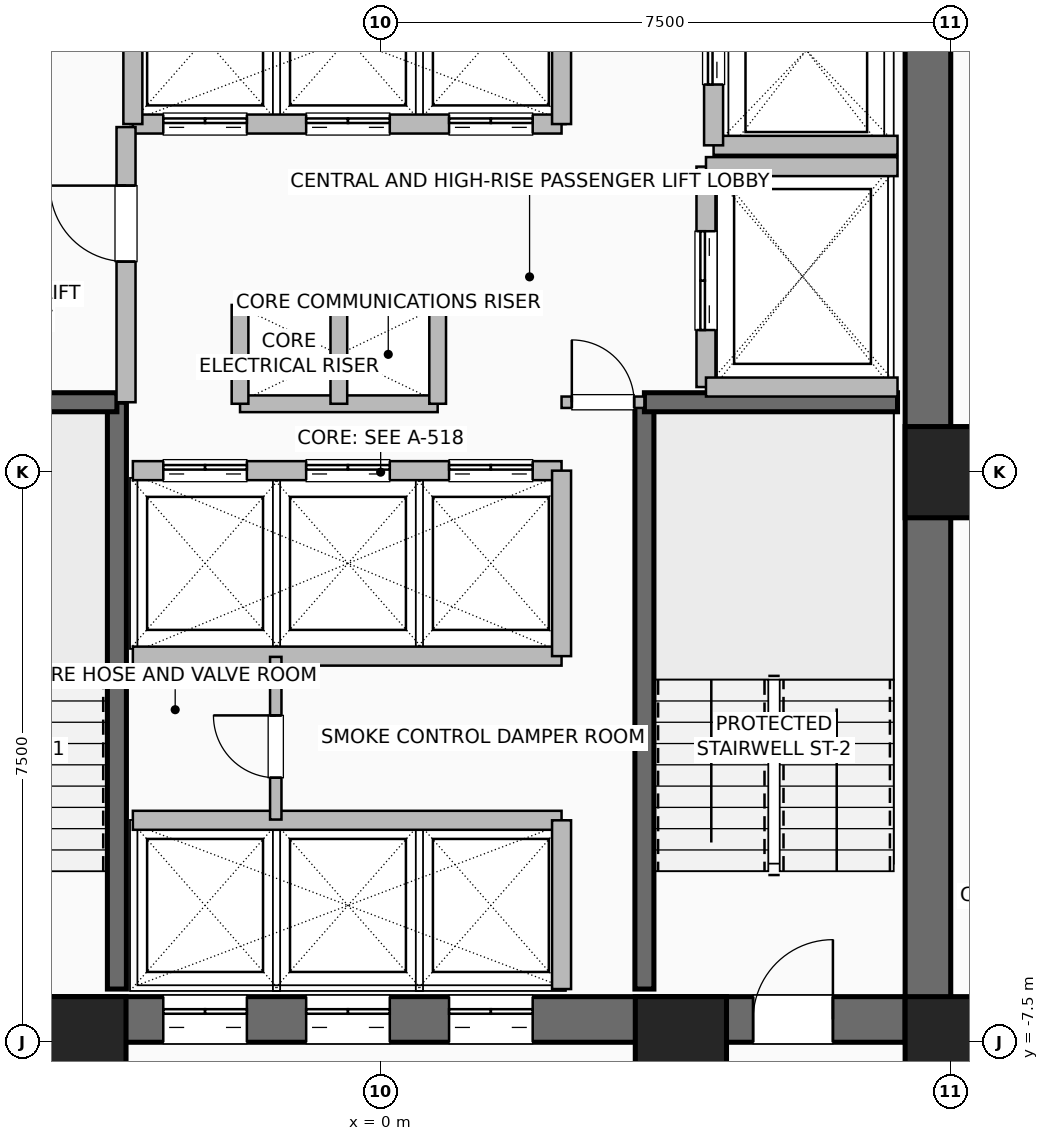
"""IFC4 building model, lengths in metres.
Left out: names, types, materials, properties, quantities, classifications, styles, units other than length and angle.
Written with IfcOpenShell. Run it as: python <this file> out.ifc"""

import sys

from ifc_helpers import new_model, si_unit, direction, frame, frame_2d, origin, origin_2d, place, context, subcontext, project, spatial, rectangle, hollow_rectangle, extrude, element, fill, save


model = new_model("IFC4")
c1 = context("Model", 3, precision=1e-05, world=origin(), true_north=direction((0.0, 1.0)))
c2 = subcontext(c1, "Body", "Model", "MODEL_VIEW")
j1 = project(units=[si_unit("LENGTHUNIT", "METRE"), si_unit("PLANEANGLEUNIT", "RADIAN")], contexts=[c1])
p1 = place(None, origin())
s1 = spatial("IfcSite", under=j1, at=p1, CompositionType="ELEMENT")
p2 = place(p1, origin())
s2 = spatial("IfcBuilding", under=s1, at=p2, CompositionType="ELEMENT")
p3 = place(p2, frame((0.0, 0.0, 69.0)))
s3 = spatial("IfcBuildingStorey", under=s2, at=p3, CompositionType="ELEMENT", Elevation=69.0)
for number, where, z_axis, x_axis in (
    (1, (-3.95, -7.5, 0.0), (0.0, 0.0, 1.0), (1.0, 0.0, 0.0)),
    (2, (3.95, -7.5, 0.0), (0.0, 0.0, 1.0), (1.0, 0.0, 0.0)),
    (3, (7.5, -7.5, 0.0), (0.0, 0.0, 1.0), (1.0, 0.0, 0.0)),
    (4, (7.5, 0.0, 0.0), (0.0, 0.0, 1.0), (1.0, 0.0, 0.0)),
):
    element("IfcColumn", number, at=place(p3, frame(where, z_axis=z_axis, x_axis=x_axis)), inside=s3, PredefinedType="COLUMN", context=c2, shape_type="SweptSolid", body=[
        extrude(hollow_rectangle(XDim=1.2, YDim=1.2, WallThickness=0.055, at=origin_2d()), origin(), (0.0, 0.0, 1.0), 3.5),
    ])
p4 = place(p3, frame((-7.5, -7.2, 0.0), z_axis=(0.0, 0.0, 1.0), x_axis=(1.0, 0.0, 0.0)))
e5 = element("IfcWall", 5, at=p4, inside=s3, PredefinedType="SHEAR", context=c2, shape_type="SweptSolid", body=[
    extrude(rectangle(XDim=15.0, YDim=0.6, at=frame_2d((7.5, 0.0))), origin(), (0.0, 0.0, 1.0), 3.25),
])
p5 = place(p4, frame((1.55, 0.0, 0.0)))
e6 = element("IfcOpeningElement", 6, at=p5, cuts=e5, PredefinedType="OPENING", context=c2, shape_type="SweptSolid", body=[
    extrude(rectangle(XDim=1.05, YDim=2.08, at=frame_2d((0.525, 1.04))), frame((0.0, 0.31, 0.0), z_axis=(0.0, -1.0, 0.0), x_axis=(1.0, 0.0, 0.0)), (0.0, 0.0, 1.0), 0.62),
])
p6 = place(p4, frame((12.4, 0.0, 0.0)))
e7 = element("IfcOpeningElement", 7, at=p6, cuts=e5, PredefinedType="OPENING", context=c2, shape_type="SweptSolid", body=[
    extrude(rectangle(XDim=1.05, YDim=2.08, at=frame_2d((0.525, 1.04))), frame((0.0, 0.31, 0.0), z_axis=(0.0, -1.0, 0.0), x_axis=(1.0, 0.0, 0.0)), (0.0, 0.0, 1.0), 0.62),
])
p7 = place(p4, frame((4.64, 0.0, 0.0)))
e8 = element("IfcOpeningElement", 8, at=p7, cuts=e5, PredefinedType="OPENING", context=c2, shape_type="SweptSolid", body=[
    extrude(rectangle(XDim=1.1, YDim=2.2, at=frame_2d((0.55, 1.1))), frame((0.0, 0.31, 0.0), z_axis=(0.0, -1.0, 0.0), x_axis=(1.0, 0.0, 0.0)), (0.0, 0.0, 1.0), 0.62),
])
p8 = place(p4, frame((6.52, 0.0, 0.0)))
e9 = element("IfcOpeningElement", 9, at=p8, cuts=e5, PredefinedType="OPENING", context=c2, shape_type="SweptSolid", body=[
    extrude(rectangle(XDim=1.1, YDim=2.2, at=frame_2d((0.55, 1.1))), frame((0.0, 0.31, 0.0), z_axis=(0.0, -1.0, 0.0), x_axis=(1.0, 0.0, 0.0)), (0.0, 0.0, 1.0), 0.62),
])
p9 = place(p4, frame((8.4, 0.0, 0.0)))
e10 = element("IfcOpeningElement", 10, at=p9, cuts=e5, PredefinedType="OPENING", context=c2, shape_type="SweptSolid", body=[
    extrude(rectangle(XDim=1.1, YDim=2.2, at=frame_2d((0.55, 1.1))), frame((0.0, 0.31, 0.0), z_axis=(0.0, -1.0, 0.0), x_axis=(1.0, 0.0, 0.0)), (0.0, 0.0, 1.0), 0.62),
])
p10 = place(p3, frame((7.2, -7.5, 0.0), z_axis=(0.0, 0.0, 1.0), x_axis=(0.0, 1.0, 0.0)))
e11 = element("IfcWall", 11, at=p10, inside=s3, PredefinedType="SHEAR", context=c2, shape_type="SweptSolid", body=[
    extrude(rectangle(XDim=15.0, YDim=0.6, at=frame_2d((7.5, 0.0))), origin(), (0.0, 0.0, 1.0), 3.25),
])
p11 = place(p3, frame((-3.47, -6.8, 0.0), z_axis=(0.0, 0.0, 1.0), x_axis=(0.0, 1.0, 0.0)))
e12 = element("IfcWall", 12, at=p11, inside=s3, PredefinedType="SHEAR", context=c2, shape_type="SweptSolid", body=[
    extrude(rectangle(XDim=7.72, YDim=0.25, at=frame_2d((3.86, 0.0))), origin(), (0.0, 0.0, 1.0), 3.25),
])
p12 = place(p3, frame((-6.8, 0.92, 0.0), z_axis=(0.0, 0.0, 1.0), x_axis=(1.0, 0.0, 0.0)))
e13 = element("IfcWall", 13, at=p12, inside=s3, PredefinedType="SHEAR", context=c2, shape_type="SweptSolid", body=[
    extrude(rectangle(XDim=3.33, YDim=0.25, at=frame_2d((1.665, 0.0))), origin(), (0.0, 0.0, 1.0), 3.25),
])
p13 = place(p3, frame((3.47, -6.8, 0.0), z_axis=(0.0, 0.0, 1.0), x_axis=(0.0, 1.0, 0.0)))
e14 = element("IfcWall", 14, at=p13, inside=s3, PredefinedType="SHEAR", context=c2, shape_type="SweptSolid", body=[
    extrude(rectangle(XDim=7.72, YDim=0.25, at=frame_2d((3.86, 0.0))), origin(), (0.0, 0.0, 1.0), 3.25),
])
p14 = place(p3, frame((3.47, 0.92, 0.0), z_axis=(0.0, 0.0, 1.0), x_axis=(1.0, 0.0, 0.0)))
e15 = element("IfcWall", 15, at=p14, inside=s3, PredefinedType="SHEAR", context=c2, shape_type="SweptSolid", body=[
    extrude(rectangle(XDim=3.33, YDim=0.25, at=frame_2d((1.665, 0.0))), origin(), (0.0, 0.0, 1.0), 3.25),
])
for number, where, z_axis, x_axis in (
    (16, (-1.85, 2.2, 0.0), (0.0, 0.0, 1.0), (1.0, 0.0, 0.0)),
    (17, (-1.85, 0.9, 0.0), (0.0, 0.0, 1.0), (1.0, 0.0, 0.0)),
):
    element("IfcWall", number, at=place(p3, frame(where, z_axis=z_axis, x_axis=x_axis)), inside=s3, PredefinedType="PARTITIONING", context=c2, shape_type="SweptSolid", body=[
        extrude(rectangle(XDim=2.6, YDim=0.22, at=frame_2d((1.3, 0.0))), origin(), (0.0, 0.0, 1.0), 3.25),
    ])
for number, where, z_axis, x_axis in (
    (18, (-0.55, 0.9, 0.0), (0.0, 0.0, 1.0), (0.0, 1.0, 0.0)),
    (19, (0.75, 0.9, 0.0), (0.0, 0.0, 1.0), (0.0, 1.0, 0.0)),
    (20, (-1.85, 0.9, 0.0), (0.0, 0.0, 1.0), (0.0, 1.0, 0.0)),
):
    element("IfcWall", number, at=place(p3, frame(where, z_axis=z_axis, x_axis=x_axis)), inside=s3, PredefinedType="PARTITIONING", context=c2, shape_type="SweptSolid", body=[
        extrude(rectangle(XDim=1.3, YDim=0.22, at=frame_2d((0.65, 0.0))), origin(), (0.0, 0.0, 1.0), 3.25),
    ])
p15 = place(p3, frame((-3.26, -4.58, 0.0), z_axis=(0.0, 0.0, 1.0), x_axis=(1.0, 0.0, 0.0)))
e21 = element("IfcWall", 21, at=p15, inside=s3, PredefinedType="SHEAR", context=c2, shape_type="SweptSolid", body=[
    extrude(rectangle(XDim=5.64, YDim=0.25, at=frame_2d((2.82, 0.0))), origin(), (0.0, 0.0, 1.0), 3.25),
])
p16 = place(p3, frame((2.38, -6.8, 0.0), z_axis=(0.0, 0.0, 1.0), x_axis=(0.0, 1.0, 0.0)))
e22 = element("IfcWall", 22, at=p16, inside=s3, PredefinedType="SHEAR", context=c2, shape_type="SweptSolid", body=[
    extrude(rectangle(XDim=2.22, YDim=0.25, at=frame_2d((1.11, 0.0))), origin(), (0.0, 0.0, 1.0), 3.25),
])
p17 = place(p3, frame((-3.26, 0.02, 0.0), z_axis=(0.0, 0.0, 1.0), x_axis=(1.0, 0.0, 0.0)))
e23 = element("IfcWall", 23, at=p17, inside=s3, PredefinedType="SHEAR", context=c2, shape_type="SweptSolid", body=[
    extrude(rectangle(XDim=5.64, YDim=0.25, at=frame_2d((2.82, 0.0))), origin(), (0.0, 0.0, 1.0), 3.25),
])
p18 = place(p17, frame((0.4, 0.0, 0.0)))
e24 = element("IfcOpeningElement", 24, at=p18, cuts=e23, PredefinedType="OPENING", context=c2, shape_type="SweptSolid", body=[
    extrude(rectangle(XDim=1.1, YDim=2.2, at=frame_2d((0.55, 1.1))), frame((0.0, 0.135, 0.0), z_axis=(0.0, -1.0, 0.0), x_axis=(1.0, 0.0, 0.0)), (0.0, 0.0, 1.0), 0.27),
])
p19 = place(p17, frame((2.28, 0.0, 0.0)))
e25 = element("IfcOpeningElement", 25, at=p19, cuts=e23, PredefinedType="OPENING", context=c2, shape_type="SweptSolid", body=[
    extrude(rectangle(XDim=1.1, YDim=2.2, at=frame_2d((0.55, 1.1))), frame((0.0, 0.135, 0.0), z_axis=(0.0, -1.0, 0.0), x_axis=(1.0, 0.0, 0.0)), (0.0, 0.0, 1.0), 0.27),
])
p20 = place(p17, frame((4.16, 0.0, 0.0)))
e26 = element("IfcOpeningElement", 26, at=p20, cuts=e23, PredefinedType="OPENING", context=c2, shape_type="SweptSolid", body=[
    extrude(rectangle(XDim=1.1, YDim=2.2, at=frame_2d((0.55, 1.1))), frame((0.0, 0.135, 0.0), z_axis=(0.0, -1.0, 0.0), x_axis=(1.0, 0.0, 0.0)), (0.0, 0.0, 1.0), 0.27),
])
p21 = place(p3, frame((-3.26, -2.42, 0.0), z_axis=(0.0, 0.0, 1.0), x_axis=(1.0, 0.0, 0.0)))
e27 = element("IfcWall", 27, at=p21, inside=s3, PredefinedType="SHEAR", context=c2, shape_type="SweptSolid", body=[
    extrude(rectangle(XDim=5.64, YDim=0.25, at=frame_2d((2.82, 0.0))), origin(), (0.0, 0.0, 1.0), 3.25),
])
p22 = place(p3, frame((2.38, -2.42, 0.0), z_axis=(0.0, 0.0, 1.0), x_axis=(0.0, 1.0, 0.0)))
e28 = element("IfcWall", 28, at=p22, inside=s3, PredefinedType="SHEAR", context=c2, shape_type="SweptSolid", body=[
    extrude(rectangle(XDim=2.44, YDim=0.25, at=frame_2d((1.22, 0.0))), origin(), (0.0, 0.0, 1.0), 3.25),
])
p23 = place(p3, frame((-3.26, 4.58, 0.0), z_axis=(0.0, 0.0, 1.0), x_axis=(1.0, 0.0, 0.0)))
e29 = element("IfcWall", 29, at=p23, inside=s3, PredefinedType="SHEAR", context=c2, shape_type="SweptSolid", body=[
    extrude(rectangle(XDim=5.64, YDim=0.25, at=frame_2d((2.82, 0.0))), origin(), (0.0, 0.0, 1.0), 3.25),
])
p24 = place(p23, frame((0.4, 0.0, 0.0)))
e30 = element("IfcOpeningElement", 30, at=p24, cuts=e29, PredefinedType="OPENING", context=c2, shape_type="SweptSolid", body=[
    extrude(rectangle(XDim=1.1, YDim=2.2, at=frame_2d((0.55, 1.1))), frame((0.0, 0.135, 0.0), z_axis=(0.0, -1.0, 0.0), x_axis=(1.0, 0.0, 0.0)), (0.0, 0.0, 1.0), 0.27),
])
p25 = place(p23, frame((2.28, 0.0, 0.0)))
e31 = element("IfcOpeningElement", 31, at=p25, cuts=e29, PredefinedType="OPENING", context=c2, shape_type="SweptSolid", body=[
    extrude(rectangle(XDim=1.1, YDim=2.2, at=frame_2d((0.55, 1.1))), frame((0.0, 0.135, 0.0), z_axis=(0.0, -1.0, 0.0), x_axis=(1.0, 0.0, 0.0)), (0.0, 0.0, 1.0), 0.27),
])
p26 = place(p23, frame((4.16, 0.0, 0.0)))
e32 = element("IfcOpeningElement", 32, at=p26, cuts=e29, PredefinedType="OPENING", context=c2, shape_type="SweptSolid", body=[
    extrude(rectangle(XDim=1.1, YDim=2.2, at=frame_2d((0.55, 1.1))), frame((0.0, 0.135, 0.0), z_axis=(0.0, -1.0, 0.0), x_axis=(1.0, 0.0, 0.0)), (0.0, 0.0, 1.0), 0.27),
])
for number, where, z_axis, x_axis in (
    (33, (-3.26, 4.58, 0.0), (0.0, 0.0, 1.0), (0.0, 1.0, 0.0)),
    (34, (2.38, 4.58, 0.0), (0.0, 0.0, 1.0), (0.0, 1.0, 0.0)),
):
    element("IfcWall", number, at=place(p3, frame(where, z_axis=z_axis, x_axis=x_axis)), inside=s3, PredefinedType="SHEAR", context=c2, shape_type="SweptSolid", body=[
        extrude(rectangle(XDim=2.22, YDim=0.25, at=frame_2d((1.11, 0.0))), origin(), (0.0, 0.0, 1.0), 3.25),
    ])
p27 = place(p3, frame((4.38, 4.3, 0.0), z_axis=(0.0, 0.0, 1.0), x_axis=(1.0, 0.0, 0.0)))
e35 = element("IfcWall", 35, at=p27, inside=s3, PredefinedType="SHEAR", context=c2, shape_type="SweptSolid", body=[
    extrude(rectangle(XDim=2.42, YDim=0.25, at=frame_2d((1.21, 0.0))), origin(), (0.0, 0.0, 1.0), 3.25),
])
p28 = place(p3, frame((4.38, 4.3, 0.0), z_axis=(0.0, 0.0, 1.0), x_axis=(0.0, 1.0, 0.0)))
e36 = element("IfcWall", 36, at=p28, inside=s3, PredefinedType="SHEAR", context=c2, shape_type="SweptSolid", body=[
    extrude(rectangle(XDim=2.5, YDim=0.25, at=frame_2d((1.25, 0.0))), origin(), (0.0, 0.0, 1.0), 3.25),
])
p29 = place(p28, frame((0.8, 0.0, 0.0)))
e37 = element("IfcOpeningElement", 37, at=p29, cuts=e36, PredefinedType="OPENING", context=c2, shape_type="SweptSolid", body=[
    extrude(rectangle(XDim=1.2, YDim=2.2, at=frame_2d((0.6, 1.1))), frame((0.0, 0.135, 0.0), z_axis=(0.0, -1.0, 0.0), x_axis=(1.0, 0.0, 0.0)), (0.0, 0.0, 1.0), 0.27),
])
p30 = place(p3, frame((4.28, 1.12, 0.0), z_axis=(0.0, 0.0, 1.0), x_axis=(0.0, 1.0, 0.0)))
e38 = element("IfcWall", 38, at=p30, inside=s3, PredefinedType="SHEAR", context=c2, shape_type="SweptSolid", body=[
    extrude(rectangle(XDim=2.9, YDim=0.25, at=frame_2d((1.45, 0.0))), origin(), (0.0, 0.0, 1.0), 3.25),
])
p31 = place(p30, frame((0.75, 0.0, 0.0)))
e39 = element("IfcOpeningElement", 39, at=p31, cuts=e38, PredefinedType="OPENING", context=c2, shape_type="SweptSolid", body=[
    extrude(rectangle(XDim=1.3, YDim=2.3, at=frame_2d((0.65, 1.15))), frame((0.0, 0.135, 0.0), z_axis=(0.0, -1.0, 0.0), x_axis=(1.0, 0.0, 0.0)), (0.0, 0.0, 1.0), 0.27),
])
for number, where, z_axis, x_axis in (
    (40, (4.28, 1.12, 0.0), (0.0, 0.0, 1.0), (1.0, 0.0, 0.0)),
    (41, (4.28, 4.02, 0.0), (0.0, 0.0, 1.0), (1.0, 0.0, 0.0)),
):
    element("IfcWall", number, at=place(p3, frame(where, z_axis=z_axis, x_axis=x_axis)), inside=s3, PredefinedType="SHEAR", context=c2, shape_type="SweptSolid", body=[
        extrude(rectangle(XDim=2.52, YDim=0.25, at=frame_2d((1.26, 0.0))), origin(), (0.0, 0.0, 1.0), 3.25),
    ])
p32 = place(p3, frame((-3.35, 0.92, 0.0), z_axis=(0.0, 0.0, 1.0), x_axis=(0.0, 1.0, 0.0)))
e42 = element("IfcWall", 42, at=p32, inside=s3, PredefinedType="SHEAR", context=c2, shape_type="SweptSolid", body=[
    extrude(rectangle(XDim=3.62, YDim=0.25, at=frame_2d((1.81, 0.0))), origin(), (0.0, 0.0, 1.0), 3.25),
])
p33 = place(p32, frame((1.85, 0.0, 0.0)))
e43 = element("IfcOpeningElement", 43, at=p33, cuts=e42, PredefinedType="OPENING", context=c2, shape_type="SweptSolid", body=[
    extrude(rectangle(XDim=1.0, YDim=2.08, at=frame_2d((0.5, 1.04))), frame((0.0, 0.135, 0.0), z_axis=(0.0, -1.0, 0.0), x_axis=(1.0, 0.0, 0.0)), (0.0, 0.0, 1.0), 0.27),
])
p34 = place(p3, frame((2.38, 0.92, 0.0), z_axis=(0.0, 0.0, 1.0), x_axis=(1.0, 0.0, 0.0)))
e44 = element("IfcWall", 44, at=p34, inside=s3, PredefinedType="PARTITIONING", context=c2, shape_type="SweptSolid", body=[
    extrude(rectangle(XDim=1.09, YDim=0.15, at=frame_2d((0.545, 0.0))), origin(), (0.0, 0.0, 1.0), 3.25),
])
p35 = place(p34, frame((0.135, 0.0, 0.0)))
e45 = element("IfcOpeningElement", 45, at=p35, cuts=e44, PredefinedType="OPENING", context=c2, shape_type="SweptSolid", body=[
    extrude(rectangle(XDim=0.82, YDim=2.05, at=frame_2d((0.41, 1.025))), frame((0.0, 0.085, 0.0), z_axis=(0.0, -1.0, 0.0), x_axis=(1.0, 0.0, 0.0)), (0.0, 0.0, 1.0), 0.17),
])
p36 = place(p3, frame((-1.38, -4.57, 0.0), z_axis=(0.0, 0.0, 1.0), x_axis=(0.0, 1.0, 0.0)))
e46 = element("IfcWall", 46, at=p36, inside=s3, PredefinedType="PARTITIONING", context=c2, shape_type="SweptSolid", body=[
    extrude(rectangle(XDim=2.14, YDim=0.15, at=frame_2d((1.07, 0.0))), origin(), (0.0, 0.0, 1.0), 3.25),
])
p37 = place(p36, frame((0.55, 0.0, 0.0)))
e47 = element("IfcOpeningElement", 47, at=p37, cuts=e46, PredefinedType="OPENING", context=c2, shape_type="SweptSolid", body=[
    extrude(rectangle(XDim=0.82, YDim=2.05, at=frame_2d((0.41, 1.025))), frame((0.0, 0.085, 0.0), z_axis=(0.0, -1.0, 0.0), x_axis=(1.0, 0.0, 0.0)), (0.0, 0.0, 1.0), 0.17),
])
p38 = place(p6, origin())
e48 = element("IfcDoor", 48, at=p38, inside=s3, OperationType="SINGLE_SWING_RIGHT", PredefinedType="DOOR", context=c2, shape_type="SweptSolid", body=[
    extrude(rectangle(XDim=1.05, YDim=2.08, at=frame_2d((0.525, 1.04))), frame((0.0, 0.025, 0.0), z_axis=(0.0, -1.0, 0.0), x_axis=(1.0, 0.0, 0.0)), (0.0, 0.0, 1.0), 0.05),
])
fill(e7, e48)
p39 = place(p7, origin())
e49 = element("IfcDoor", 49, at=p39, inside=s3, OperationType="DOUBLE_DOOR_SLIDING", PredefinedType="DOOR", context=c2, shape_type="SweptSolid", body=[
    extrude(rectangle(XDim=1.1, YDim=2.2, at=frame_2d((0.55, 1.1))), frame((0.0, 0.025, 0.0), z_axis=(0.0, -1.0, 0.0), x_axis=(1.0, 0.0, 0.0)), (0.0, 0.0, 1.0), 0.05),
])
fill(e8, e49)
p40 = place(p8, origin())
e50 = element("IfcDoor", 50, at=p40, inside=s3, OperationType="DOUBLE_DOOR_SLIDING", PredefinedType="DOOR", context=c2, shape_type="SweptSolid", body=[
    extrude(rectangle(XDim=1.1, YDim=2.2, at=frame_2d((0.55, 1.1))), frame((0.0, 0.025, 0.0), z_axis=(0.0, -1.0, 0.0), x_axis=(1.0, 0.0, 0.0)), (0.0, 0.0, 1.0), 0.05),
])
fill(e9, e50)
p41 = place(p9, origin())
e51 = element("IfcDoor", 51, at=p41, inside=s3, OperationType="DOUBLE_DOOR_SLIDING", PredefinedType="DOOR", context=c2, shape_type="SweptSolid", body=[
    extrude(rectangle(XDim=1.1, YDim=2.2, at=frame_2d((0.55, 1.1))), frame((0.0, 0.025, 0.0), z_axis=(0.0, -1.0, 0.0), x_axis=(1.0, 0.0, 0.0)), (0.0, 0.0, 1.0), 0.05),
])
fill(e10, e51)
p42 = place(p18, origin())
e52 = element("IfcDoor", 52, at=p42, inside=s3, OperationType="DOUBLE_DOOR_SLIDING", PredefinedType="DOOR", context=c2, shape_type="SweptSolid", body=[
    extrude(rectangle(XDim=1.1, YDim=2.2, at=frame_2d((0.55, 1.1))), frame((0.0, 0.025, 0.0), z_axis=(0.0, -1.0, 0.0), x_axis=(1.0, 0.0, 0.0)), (0.0, 0.0, 1.0), 0.05),
])
fill(e24, e52)
p43 = place(p19, origin())
e53 = element("IfcDoor", 53, at=p43, inside=s3, OperationType="DOUBLE_DOOR_SLIDING", PredefinedType="DOOR", context=c2, shape_type="SweptSolid", body=[
    extrude(rectangle(XDim=1.1, YDim=2.2, at=frame_2d((0.55, 1.1))), frame((0.0, 0.025, 0.0), z_axis=(0.0, -1.0, 0.0), x_axis=(1.0, 0.0, 0.0)), (0.0, 0.0, 1.0), 0.05),
])
fill(e25, e53)
p44 = place(p20, origin())
e54 = element("IfcDoor", 54, at=p44, inside=s3, OperationType="DOUBLE_DOOR_SLIDING", PredefinedType="DOOR", context=c2, shape_type="SweptSolid", body=[
    extrude(rectangle(XDim=1.1, YDim=2.2, at=frame_2d((0.55, 1.1))), frame((0.0, 0.025, 0.0), z_axis=(0.0, -1.0, 0.0), x_axis=(1.0, 0.0, 0.0)), (0.0, 0.0, 1.0), 0.05),
])
fill(e26, e54)
p45 = place(p24, origin())
e55 = element("IfcDoor", 55, at=p45, inside=s3, OperationType="DOUBLE_DOOR_SLIDING", PredefinedType="DOOR", context=c2, shape_type="SweptSolid", body=[
    extrude(rectangle(XDim=1.1, YDim=2.2, at=frame_2d((0.55, 1.1))), frame((0.0, 0.025, 0.0), z_axis=(0.0, -1.0, 0.0), x_axis=(1.0, 0.0, 0.0)), (0.0, 0.0, 1.0), 0.05),
])
fill(e30, e55)
p46 = place(p25, origin())
e56 = element("IfcDoor", 56, at=p46, inside=s3, OperationType="DOUBLE_DOOR_SLIDING", PredefinedType="DOOR", context=c2, shape_type="SweptSolid", body=[
    extrude(rectangle(XDim=1.1, YDim=2.2, at=frame_2d((0.55, 1.1))), frame((0.0, 0.025, 0.0), z_axis=(0.0, -1.0, 0.0), x_axis=(1.0, 0.0, 0.0)), (0.0, 0.0, 1.0), 0.05),
])
fill(e31, e56)
p47 = place(p26, origin())
e57 = element("IfcDoor", 57, at=p47, inside=s3, OperationType="DOUBLE_DOOR_SLIDING", PredefinedType="DOOR", context=c2, shape_type="SweptSolid", body=[
    extrude(rectangle(XDim=1.1, YDim=2.2, at=frame_2d((0.55, 1.1))), frame((0.0, 0.025, 0.0), z_axis=(0.0, -1.0, 0.0), x_axis=(1.0, 0.0, 0.0)), (0.0, 0.0, 1.0), 0.05),
])
fill(e32, e57)
p48 = place(p29, origin())
e58 = element("IfcDoor", 58, at=p48, inside=s3, OperationType="DOUBLE_DOOR_SLIDING", PredefinedType="DOOR", context=c2, shape_type="SweptSolid", body=[
    extrude(rectangle(XDim=1.2, YDim=2.2, at=frame_2d((0.6, 1.1))), frame((0.0, 0.025, 0.0), z_axis=(0.0, -1.0, 0.0), x_axis=(1.0, 0.0, 0.0)), (0.0, 0.0, 1.0), 0.05),
])
fill(e37, e58)
p49 = place(p31, origin())
e59 = element("IfcDoor", 59, at=p49, inside=s3, OperationType="DOUBLE_DOOR_SLIDING", PredefinedType="DOOR", context=c2, shape_type="SweptSolid", body=[
    extrude(rectangle(XDim=1.3, YDim=2.3, at=frame_2d((0.65, 1.15))), frame((0.0, 0.025, 0.0), z_axis=(0.0, -1.0, 0.0), x_axis=(1.0, 0.0, 0.0)), (0.0, 0.0, 1.0), 0.05),
])
fill(e39, e59)
p50 = place(p33, origin())
e60 = element("IfcDoor", 60, at=p50, inside=s3, OperationType="SINGLE_SWING_RIGHT", PredefinedType="DOOR", context=c2, shape_type="SweptSolid", body=[
    extrude(rectangle(XDim=1.0, YDim=2.08, at=frame_2d((0.5, 1.04))), frame((0.0, 0.025, 0.0), z_axis=(0.0, -1.0, 0.0), x_axis=(1.0, 0.0, 0.0)), (0.0, 0.0, 1.0), 0.05),
])
fill(e43, e60)
p51 = place(p35, origin())
e61 = element("IfcDoor", 61, at=p51, inside=s3, OperationType="SINGLE_SWING_LEFT", PredefinedType="DOOR", context=c2, shape_type="SweptSolid", body=[
    extrude(rectangle(XDim=0.82, YDim=2.05, at=frame_2d((0.41, 1.025))), frame((0.0, 0.025, 0.0), z_axis=(0.0, -1.0, 0.0), x_axis=(1.0, 0.0, 0.0)), (0.0, 0.0, 1.0), 0.05),
])
fill(e45, e61)
p52 = place(p37, origin())
e62 = element("IfcDoor", 62, at=p52, inside=s3, OperationType="SINGLE_SWING_RIGHT", PredefinedType="DOOR", context=c2, shape_type="SweptSolid", body=[
    extrude(rectangle(XDim=0.82, YDim=2.05, at=frame_2d((0.41, 1.025))), frame((0.0, 0.025, 0.0), z_axis=(0.0, -1.0, 0.0), x_axis=(1.0, 0.0, 0.0)), (0.0, 0.0, 1.0), 0.05),
])
fill(e47, e62)
save(model, sys.argv[1])
